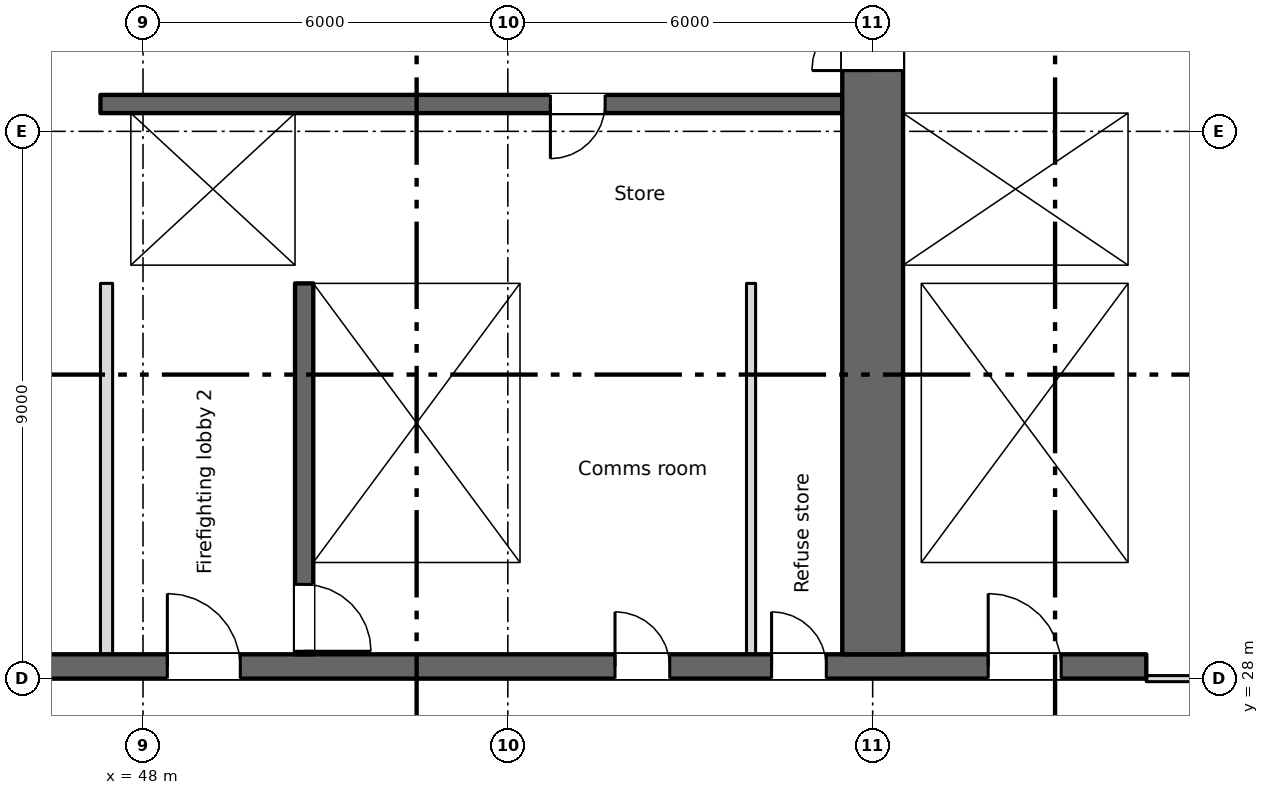
"""IFC4 building model, lengths in metres.
Left out: names, types, materials, properties, quantities, classifications, styles, units other than length and angle.
Written with IfcOpenShell. Run it as: python <this file> out.ifc"""

import sys

from ifc_helpers import new_model, si_unit, direction, frame, frame_2d, origin, place, context, subcontext, project, spatial, rectangle, extrude, element, fill, save


model = new_model("IFC4")
c1 = context("Model", 3, precision=1e-05, world=origin(), true_north=direction((0.0, 1.0)))
c2 = subcontext(c1, "Body", "Model", "MODEL_VIEW")
j1 = project(units=[si_unit("LENGTHUNIT", "METRE"), si_unit("PLANEANGLEUNIT", "RADIAN")], contexts=[c1])
p1 = place(None, origin())
s1 = spatial("IfcSite", under=j1, at=p1, CompositionType="ELEMENT")
p2 = place(p1, origin())
s2 = spatial("IfcBuilding", under=s1, at=p2, CompositionType="ELEMENT")
p3 = place(p2, frame((0.0, 0.0, 37.5)))
s3 = spatial("IfcBuildingStorey", under=s2, at=p3, CompositionType="ELEMENT", Elevation=37.5)
p4 = place(p3, frame((6.7, 28.2, 0.0), z_axis=(0.0, 0.0, 1.0), x_axis=(1.0, 0.0, 0.0)))
e1 = element("IfcWall", 1, at=p4, inside=s3, PredefinedType="SHEAR", context=c2, shape_type="SweptSolid", body=[
    extrude(rectangle(XDim=57.8, YDim=0.4, at=frame_2d((28.9, 0.0))), origin(), (0.0, 0.0, 1.0), 3.35),
])
p5 = place(p4, frame((12.062, 0.0, 0.0)))
e2 = element("IfcOpeningElement", 2, at=p5, cuts=e1, PredefinedType="OPENING", context=c2, shape_type="SweptSolid", body=[
    extrude(rectangle(XDim=0.9, YDim=2.1, at=frame_2d((0.45, 1.05))), frame((0.0, 0.21, 0.0), z_axis=(0.0, -1.0, 0.0), x_axis=(1.0, 0.0, 0.0)), (0.0, 0.0, 1.0), 0.42),
])
p6 = place(p4, frame((14.637, 0.0, 0.0)))
e3 = element("IfcOpeningElement", 3, at=p6, cuts=e1, PredefinedType="OPENING", context=c2, shape_type="SweptSolid", body=[
    extrude(rectangle(XDim=0.9, YDim=2.1, at=frame_2d((0.45, 1.05))), frame((0.0, 0.21, 0.0), z_axis=(0.0, -1.0, 0.0), x_axis=(1.0, 0.0, 0.0)), (0.0, 0.0, 1.0), 0.42),
])
p7 = place(p4, frame((49.062, 0.0, 0.0)))
e4 = element("IfcOpeningElement", 4, at=p7, cuts=e1, PredefinedType="OPENING", context=c2, shape_type="SweptSolid", body=[
    extrude(rectangle(XDim=0.9, YDim=2.1, at=frame_2d((0.45, 1.05))), frame((0.0, 0.21, 0.0), z_axis=(0.0, -1.0, 0.0), x_axis=(1.0, 0.0, 0.0)), (0.0, 0.0, 1.0), 0.42),
])
p8 = place(p4, frame((51.637, 0.0, 0.0)))
e5 = element("IfcOpeningElement", 5, at=p8, cuts=e1, PredefinedType="OPENING", context=c2, shape_type="SweptSolid", body=[
    extrude(rectangle(XDim=0.9, YDim=2.1, at=frame_2d((0.45, 1.05))), frame((0.0, 0.21, 0.0), z_axis=(0.0, -1.0, 0.0), x_axis=(1.0, 0.0, 0.0)), (0.0, 0.0, 1.0), 0.42),
])
p9 = place(p4, frame((1.35, 0.0, 0.0)))
e6 = element("IfcOpeningElement", 6, at=p9, cuts=e1, PredefinedType="OPENING", context=c2, shape_type="SweptSolid", body=[
    extrude(rectangle(XDim=0.9, YDim=2.1, at=frame_2d((0.45, 1.05))), frame((0.0, 0.21, 0.0), z_axis=(0.0, -1.0, 0.0), x_axis=(1.0, 0.0, 0.0)), (0.0, 0.0, 1.0), 0.42),
])
p10 = place(p4, frame((4.7, 0.0, 0.0)))
e7 = element("IfcOpeningElement", 7, at=p10, cuts=e1, PredefinedType="OPENING", context=c2, shape_type="SweptSolid", body=[
    extrude(rectangle(XDim=1.2, YDim=2.1, at=frame_2d((0.6, 1.05))), frame((0.0, 0.21, 0.0), z_axis=(0.0, -1.0, 0.0), x_axis=(1.0, 0.0, 0.0)), (0.0, 0.0, 1.0), 0.42),
])
p11 = place(p4, frame((31.7, 0.0, 0.0)))
e8 = element("IfcOpeningElement", 8, at=p11, cuts=e1, PredefinedType="OPENING", context=c2, shape_type="SweptSolid", body=[
    extrude(rectangle(XDim=1.2, YDim=2.1, at=frame_2d((0.6, 1.05))), frame((0.0, 0.21, 0.0), z_axis=(0.0, -1.0, 0.0), x_axis=(1.0, 0.0, 0.0)), (0.0, 0.0, 1.0), 0.42),
])
p12 = place(p4, frame((55.2, 0.0, 0.0)))
e9 = element("IfcOpeningElement", 9, at=p12, cuts=e1, PredefinedType="OPENING", context=c2, shape_type="SweptSolid", body=[
    extrude(rectangle(XDim=1.2, YDim=2.1, at=frame_2d((0.6, 1.05))), frame((0.0, 0.21, 0.0), z_axis=(0.0, -1.0, 0.0), x_axis=(1.0, 0.0, 0.0)), (0.0, 0.0, 1.0), 0.42),
])
p13 = place(p4, frame((21.7, 0.0, 0.0)))
e10 = element("IfcOpeningElement", 10, at=p13, cuts=e1, PredefinedType="OPENING", context=c2, shape_type="SweptSolid", body=[
    extrude(rectangle(XDim=1.2, YDim=2.1, at=frame_2d((0.6, 1.05))), frame((0.0, 0.21, 0.0), z_axis=(0.0, -1.0, 0.0), x_axis=(1.0, 0.0, 0.0)), (0.0, 0.0, 1.0), 0.42),
])
p14 = place(p4, frame((41.7, 0.0, 0.0)))
e11 = element("IfcOpeningElement", 11, at=p14, cuts=e1, PredefinedType="OPENING", context=c2, shape_type="SweptSolid", body=[
    extrude(rectangle(XDim=1.2, YDim=2.1, at=frame_2d((0.6, 1.05))), frame((0.0, 0.21, 0.0), z_axis=(0.0, -1.0, 0.0), x_axis=(1.0, 0.0, 0.0)), (0.0, 0.0, 1.0), 0.42),
])
p15 = place(p4, frame((24.85, 0.0, 0.0)))
e12 = element("IfcOpeningElement", 12, at=p15, cuts=e1, PredefinedType="OPENING", context=c2, shape_type="SweptSolid", body=[
    extrude(rectangle(XDim=2.4, YDim=2.1, at=frame_2d((1.2, 1.05))), frame((0.0, 0.21, 0.0), z_axis=(0.0, -1.0, 0.0), x_axis=(1.0, 0.0, 0.0)), (0.0, 0.0, 1.0), 0.42),
])
p16 = place(p4, frame((37.35, 0.0, 0.0)))
e13 = element("IfcOpeningElement", 13, at=p16, cuts=e1, PredefinedType="OPENING", context=c2, shape_type="SweptSolid", body=[
    extrude(rectangle(XDim=2.4, YDim=2.1, at=frame_2d((1.2, 1.05))), frame((0.0, 0.21, 0.0), z_axis=(0.0, -1.0, 0.0), x_axis=(1.0, 0.0, 0.0)), (0.0, 0.0, 1.0), 0.42),
])
p17 = place(p4, frame((7.85, 0.0, 0.0)))
e14 = element("IfcOpeningElement", 14, at=p17, cuts=e1, PredefinedType="OPENING", context=c2, shape_type="SweptSolid", body=[
    extrude(rectangle(XDim=2.4, YDim=2.1, at=frame_2d((1.2, 1.05))), frame((0.0, 0.21, 0.0), z_axis=(0.0, -1.0, 0.0), x_axis=(1.0, 0.0, 0.0)), (0.0, 0.0, 1.0), 0.42),
])
p18 = place(p4, frame((28.85, 0.0, 0.0)))
e15 = element("IfcOpeningElement", 15, at=p18, cuts=e1, PredefinedType="OPENING", context=c2, shape_type="SweptSolid", body=[
    extrude(rectangle(XDim=0.9, YDim=2.1, at=frame_2d((0.45, 1.05))), frame((0.0, 0.21, 0.0), z_axis=(0.0, -1.0, 0.0), x_axis=(1.0, 0.0, 0.0)), (0.0, 0.0, 1.0), 0.42),
])
p19 = place(p4, frame((34.85, 0.0, 0.0)))
e16 = element("IfcOpeningElement", 16, at=p19, cuts=e1, PredefinedType="OPENING", context=c2, shape_type="SweptSolid", body=[
    extrude(rectangle(XDim=0.9, YDim=2.1, at=frame_2d((0.45, 1.05))), frame((0.0, 0.21, 0.0), z_axis=(0.0, -1.0, 0.0), x_axis=(1.0, 0.0, 0.0)), (0.0, 0.0, 1.0), 0.42),
])
p20 = place(p3, frame((64.35, 34.8, 0.0), z_axis=(0.0, 0.0, 1.0), x_axis=(0.0, 1.0, 0.0)))
e17 = element("IfcWall", 17, at=p20, inside=s3, PredefinedType="SHEAR", context=c2, shape_type="SweptSolid", body=[
    extrude(rectangle(XDim=10.2, YDim=0.3, at=frame_2d((5.1, 0.0))), origin(), (0.0, 0.0, 1.0), 3.35),
])
p21 = place(p3, frame((60.0, 28.4, 0.0), z_axis=(0.0, 0.0, 1.0), x_axis=(0.0, 1.0, 0.0)))
e18 = element("IfcWall", 18, at=p21, inside=s3, PredefinedType="SHEAR", context=c2, shape_type="SweptSolid", body=[
    extrude(rectangle(XDim=16.6, YDim=1.0, at=frame_2d((8.3, 0.0))), origin(), (0.0, 0.0, 1.0), 3.35),
])
p22 = place(p21, frame((9.6, 0.0, 0.0)))
e19 = element("IfcOpeningElement", 19, at=p22, cuts=e18, PredefinedType="OPENING", context=c2, shape_type="SweptSolid", body=[
    extrude(rectangle(XDim=2.0, YDim=2.1, at=frame_2d((1.0, 1.05))), frame((0.0, 0.51, 0.0), z_axis=(0.0, -1.0, 0.0), x_axis=(1.0, 0.0, 0.0)), (0.0, 0.0, 1.0), 1.02),
])
p23 = place(p21, frame((15.25, 0.0, 0.0)))
e20 = element("IfcOpeningElement", 20, at=p23, cuts=e18, PredefinedType="OPENING", context=c2, shape_type="SweptSolid", body=[
    extrude(rectangle(XDim=1.2, YDim=2.1, at=frame_2d((0.6, 1.05))), frame((0.0, 0.51, 0.0), z_axis=(0.0, -1.0, 0.0), x_axis=(1.0, 0.0, 0.0)), (0.0, 0.0, 1.0), 1.02),
])
p24 = place(p3, frame((50.65, 34.5, 0.0), z_axis=(0.0, 0.0, 1.0), x_axis=(0.0, -1.0, 0.0)))
e21 = element("IfcWall", 21, at=p24, inside=s3, PredefinedType="SHEAR", context=c2, shape_type="SweptSolid", body=[
    extrude(rectangle(XDim=6.1, YDim=0.3, at=frame_2d((3.05, 0.0))), origin(), (0.0, 0.0, 1.0), 3.35),
])
p25 = place(p24, frame((4.95, 0.0, 0.0)))
e22 = element("IfcOpeningElement", 22, at=p25, cuts=e21, PredefinedType="OPENING", context=c2, shape_type="SweptSolid", body=[
    extrude(rectangle(XDim=1.1, YDim=2.1, at=frame_2d((0.55, 1.05))), frame((0.0, 0.16, 0.0), z_axis=(0.0, -1.0, 0.0), x_axis=(1.0, 0.0, 0.0)), (0.0, 0.0, 1.0), 0.32),
])
for number, where, z_axis, x_axis in (
    (23, (54.35, 28.4, 0.0), (0.0, 0.0, 1.0), (0.0, 1.0, 0.0)),
    (24, (60.65, 28.4, 0.0), (0.0, 0.0, 1.0), (0.0, 1.0, 0.0)),
    (25, (64.35, 28.4, 0.0), (0.0, 0.0, 1.0), (0.0, 1.0, 0.0)),
):
    element("IfcWall", number, at=place(p3, frame(where, z_axis=z_axis, x_axis=x_axis)), inside=s3, PredefinedType="SHEAR", context=c2, shape_type="SweptSolid", body=[
        extrude(rectangle(XDim=6.1, YDim=0.3, at=frame_2d((3.05, 0.0))), origin(), (0.0, 0.0, 1.0), 3.35),
    ])
p26 = place(p3, frame((47.3, 34.65, 0.0), z_axis=(0.0, 0.0, 1.0), x_axis=(1.0, 0.0, 0.0)))
e26 = element("IfcWall", 26, at=p26, inside=s3, PredefinedType="SHEAR", context=c2, shape_type="SweptSolid", body=[
    extrude(rectangle(XDim=12.2, YDim=0.3, at=frame_2d((6.1, 0.0))), origin(), (0.0, 0.0, 1.0), 3.35),
])
p27 = place(p26, frame((1.3, 0.0, 0.0)))
e27 = element("IfcOpeningElement", 27, at=p27, cuts=e26, PredefinedType="OPENING", context=c2, shape_type="SweptSolid", body=[
    extrude(rectangle(XDim=1.1, YDim=2.1, at=frame_2d((0.55, 1.05))), frame((0.0, 0.16, 0.0), z_axis=(0.0, -1.0, 0.0), x_axis=(1.0, 0.0, 0.0)), (0.0, 0.0, 1.0), 0.32),
])
p28 = place(p3, frame((60.5, 34.65, 0.0), z_axis=(0.0, 0.0, 1.0), x_axis=(1.0, 0.0, 0.0)))
e28 = element("IfcWall", 28, at=p28, inside=s3, PredefinedType="SHEAR", context=c2, shape_type="SweptSolid", body=[
    extrude(rectangle(XDim=4.0, YDim=0.3, at=frame_2d((2.0, 0.0))), origin(), (0.0, 0.0, 1.0), 3.35),
])
p29 = place(p3, frame((59.5, 37.45, 0.0), z_axis=(0.0, 0.0, 1.0), x_axis=(-1.0, 0.0, 0.0)))
e29 = element("IfcWall", 29, at=p29, inside=s3, PredefinedType="SHEAR", context=c2, shape_type="SweptSolid", body=[
    extrude(rectangle(XDim=12.2, YDim=0.3, at=frame_2d((6.1, 0.0))), origin(), (0.0, 0.0, 1.0), 3.35),
])
p30 = place(p29, frame((3.9, 0.0, 0.0)))
e30 = element("IfcOpeningElement", 30, at=p30, cuts=e29, PredefinedType="OPENING", context=c2, shape_type="SweptSolid", body=[
    extrude(rectangle(XDim=0.9, YDim=2.1, at=frame_2d((0.45, 1.05))), frame((0.0, 0.16, 0.0), z_axis=(0.0, -1.0, 0.0), x_axis=(1.0, 0.0, 0.0)), (0.0, 0.0, 1.0), 0.32),
])
p31 = place(p3, frame((60.5, 37.45, 0.0), z_axis=(0.0, 0.0, 1.0), x_axis=(1.0, 0.0, 0.0)))
e31 = element("IfcWall", 31, at=p31, inside=s3, PredefinedType="SHEAR", context=c2, shape_type="SweptSolid", body=[
    extrude(rectangle(XDim=3.7, YDim=0.3, at=frame_2d((1.85, 0.0))), origin(), (0.0, 0.0, 1.0), 3.35),
])
p32 = place(p31, frame((1.3, 0.0, 0.0)))
e32 = element("IfcOpeningElement", 32, at=p32, cuts=e31, PredefinedType="OPENING", context=c2, shape_type="SweptSolid", body=[
    extrude(rectangle(XDim=1.1, YDim=2.1, at=frame_2d((0.55, 1.05))), frame((0.0, 0.16, 0.0), z_axis=(0.0, -1.0, 0.0), x_axis=(1.0, 0.0, 0.0)), (0.0, 0.0, 1.0), 0.32),
])
p33 = place(p3, frame((47.55, 34.8, 0.0), z_axis=(0.0, 0.0, 1.0), x_axis=(0.0, 1.0, 0.0)))
e33 = element("IfcWall", 33, at=p33, inside=s3, PredefinedType="SHEAR", context=c2, shape_type="SweptSolid", body=[
    extrude(rectangle(XDim=2.5, YDim=0.5, at=frame_2d((1.25, 0.0))), origin(), (0.0, 0.0, 1.0), 3.35),
])
p34 = place(p3, frame((50.65, 34.8, 0.0), z_axis=(0.0, 0.0, 1.0), x_axis=(0.0, 1.0, 0.0)))
e34 = element("IfcWall", 34, at=p34, inside=s3, PredefinedType="SHEAR", context=c2, shape_type="SweptSolid", body=[
    extrude(rectangle(XDim=2.5, YDim=0.3, at=frame_2d((1.25, 0.0))), origin(), (0.0, 0.0, 1.0), 3.35),
])
p35 = place(p3, frame((47.4, 28.4, 0.0), z_axis=(0.0, 0.0, 1.0), x_axis=(0.0, 1.0, 0.0)))
e35 = element("IfcWall", 35, at=p35, inside=s3, PredefinedType="PARTITIONING", context=c2, shape_type="SweptSolid", body=[
    extrude(rectangle(XDim=6.1, YDim=0.2, at=frame_2d((3.05, 0.0))), origin(), (0.0, 0.0, 1.0), 3.35),
])
p36 = place(p3, frame((58.0, 28.4, 0.0), z_axis=(0.0, 0.0, 1.0), x_axis=(0.0, 1.0, 0.0)))
e36 = element("IfcWall", 36, at=p36, inside=s3, PredefinedType="PARTITIONING", context=c2, shape_type="SweptSolid", body=[
    extrude(rectangle(XDim=6.1, YDim=0.15, at=frame_2d((3.05, 0.0))), origin(), (0.0, 0.0, 1.0), 3.35),
])
p37 = place(p3, frame((64.5, 28.0, 0.0), z_axis=(0.0, 0.0, 1.0), x_axis=(1.0, 0.0, 0.0)))
e37 = element("IfcWall", 37, at=p37, inside=s3, PredefinedType="PARTITIONING", context=c2, shape_type="SweptSolid", body=[
    extrude(rectangle(XDim=12.7, YDim=0.1, at=frame_2d((6.35, 0.0))), origin(), (0.0, 0.0, 1.0), 3.35),
])
p38 = place(p37, frame((8.975, 0.0, 0.0)))
e38 = element("IfcOpeningElement", 38, at=p38, cuts=e37, PredefinedType="OPENING", context=c2, shape_type="SweptSolid", body=[
    extrude(rectangle(XDim=1.8, YDim=2.1, at=frame_2d((0.9, 1.05))), frame((0.0, 0.06, 0.0), z_axis=(0.0, -1.0, 0.0), x_axis=(1.0, 0.0, 0.0)), (0.0, 0.0, 1.0), 0.12),
])
p39 = place(p37, frame((2.625, 0.0, 0.0)))
e39 = element("IfcOpeningElement", 39, at=p39, cuts=e37, PredefinedType="OPENING", context=c2, shape_type="SweptSolid", body=[
    extrude(rectangle(XDim=1.8, YDim=2.1, at=frame_2d((0.9, 1.05))), frame((0.0, 0.06, 0.0), z_axis=(0.0, -1.0, 0.0), x_axis=(1.0, 0.0, 0.0)), (0.0, 0.0, 1.0), 0.12),
])
p40 = place(p7, origin())
e40 = element("IfcDoor", 40, at=p40, inside=s3, OperationType="SINGLE_SWING_LEFT", PredefinedType="DOOR", context=c2, shape_type="SweptSolid", body=[
    extrude(rectangle(XDim=0.9, YDim=2.1, at=frame_2d((0.45, 1.05))), frame((0.0, 0.025, 0.0), z_axis=(0.0, -1.0, 0.0), x_axis=(1.0, 0.0, 0.0)), (0.0, 0.0, 1.0), 0.05),
])
fill(e4, e40)
p41 = place(p8, origin())
e41 = element("IfcDoor", 41, at=p41, inside=s3, OperationType="SINGLE_SWING_LEFT", PredefinedType="DOOR", context=c2, shape_type="SweptSolid", body=[
    extrude(rectangle(XDim=0.9, YDim=2.1, at=frame_2d((0.45, 1.05))), frame((0.0, 0.025, 0.0), z_axis=(0.0, -1.0, 0.0), x_axis=(1.0, 0.0, 0.0)), (0.0, 0.0, 1.0), 0.05),
])
fill(e5, e41)
p42 = place(p30, origin())
e42 = element("IfcDoor", 42, at=p42, inside=s3, OperationType="SINGLE_SWING_RIGHT", PredefinedType="DOOR", context=c2, shape_type="SweptSolid", body=[
    extrude(rectangle(XDim=0.9, YDim=2.1, at=frame_2d((0.45, 1.05))), frame((0.0, 0.025, 0.0), z_axis=(0.0, -1.0, 0.0), x_axis=(1.0, 0.0, 0.0)), (0.0, 0.0, 1.0), 0.05),
])
fill(e30, e42)
p43 = place(p32, origin())
e43 = element("IfcDoor", 43, at=p43, inside=s3, OperationType="SLIDING_TO_LEFT", PredefinedType="DOOR", context=c2, shape_type="SweptSolid", body=[
    extrude(rectangle(XDim=1.1, YDim=2.1, at=frame_2d((0.55, 1.05))), frame((0.0, 0.025, 0.0), z_axis=(0.0, -1.0, 0.0), x_axis=(1.0, 0.0, 0.0)), (0.0, 0.0, 1.0), 0.05),
])
fill(e32, e43)
p44 = place(p27, origin())
e44 = element("IfcDoor", 44, at=p44, inside=s3, OperationType="SLIDING_TO_LEFT", PredefinedType="DOOR", context=c2, shape_type="SweptSolid", body=[
    extrude(rectangle(XDim=1.1, YDim=2.1, at=frame_2d((0.55, 1.05))), frame((0.0, 0.025, 0.0), z_axis=(0.0, -1.0, 0.0), x_axis=(1.0, 0.0, 0.0)), (0.0, 0.0, 1.0), 0.05),
])
fill(e27, e44)
p45 = place(p25, origin())
e45 = element("IfcDoor", 45, at=p45, inside=s3, OperationType="SINGLE_SWING_RIGHT", PredefinedType="DOOR", context=c2, shape_type="SweptSolid", body=[
    extrude(rectangle(XDim=1.1, YDim=2.1, at=frame_2d((0.55, 1.05))), frame((0.0, 0.025, 0.0), z_axis=(0.0, -1.0, 0.0), x_axis=(1.0, 0.0, 0.0)), (0.0, 0.0, 1.0), 0.05),
])
fill(e22, e45)
p46 = place(p12, origin())
e46 = element("IfcDoor", 46, at=p46, inside=s3, OperationType="SINGLE_SWING_LEFT", PredefinedType="DOOR", context=c2, shape_type="SweptSolid", body=[
    extrude(rectangle(XDim=1.2, YDim=2.1, at=frame_2d((0.6, 1.05))), frame((0.0, 0.025, 0.0), z_axis=(0.0, -1.0, 0.0), x_axis=(1.0, 0.0, 0.0)), (0.0, 0.0, 1.0), 0.05),
])
fill(e9, e46)
p47 = place(p14, origin())
e47 = element("IfcDoor", 47, at=p47, inside=s3, OperationType="SINGLE_SWING_LEFT", PredefinedType="DOOR", context=c2, shape_type="SweptSolid", body=[
    extrude(rectangle(XDim=1.2, YDim=2.1, at=frame_2d((0.6, 1.05))), frame((0.0, 0.025, 0.0), z_axis=(0.0, -1.0, 0.0), x_axis=(1.0, 0.0, 0.0)), (0.0, 0.0, 1.0), 0.05),
])
fill(e11, e47)
p48 = place(p22, origin())
e48 = element("IfcDoor", 48, at=p48, inside=s3, OperationType="DOUBLE_DOOR_SINGLE_SWING", PredefinedType="DOOR", context=c2, shape_type="SweptSolid", body=[
    extrude(rectangle(XDim=2.0, YDim=2.1, at=frame_2d((1.0, 1.05))), frame((0.0, 0.025, 0.0), z_axis=(0.0, -1.0, 0.0), x_axis=(1.0, 0.0, 0.0)), (0.0, 0.0, 1.0), 0.05),
])
fill(e19, e48)
save(model, sys.argv[1])
